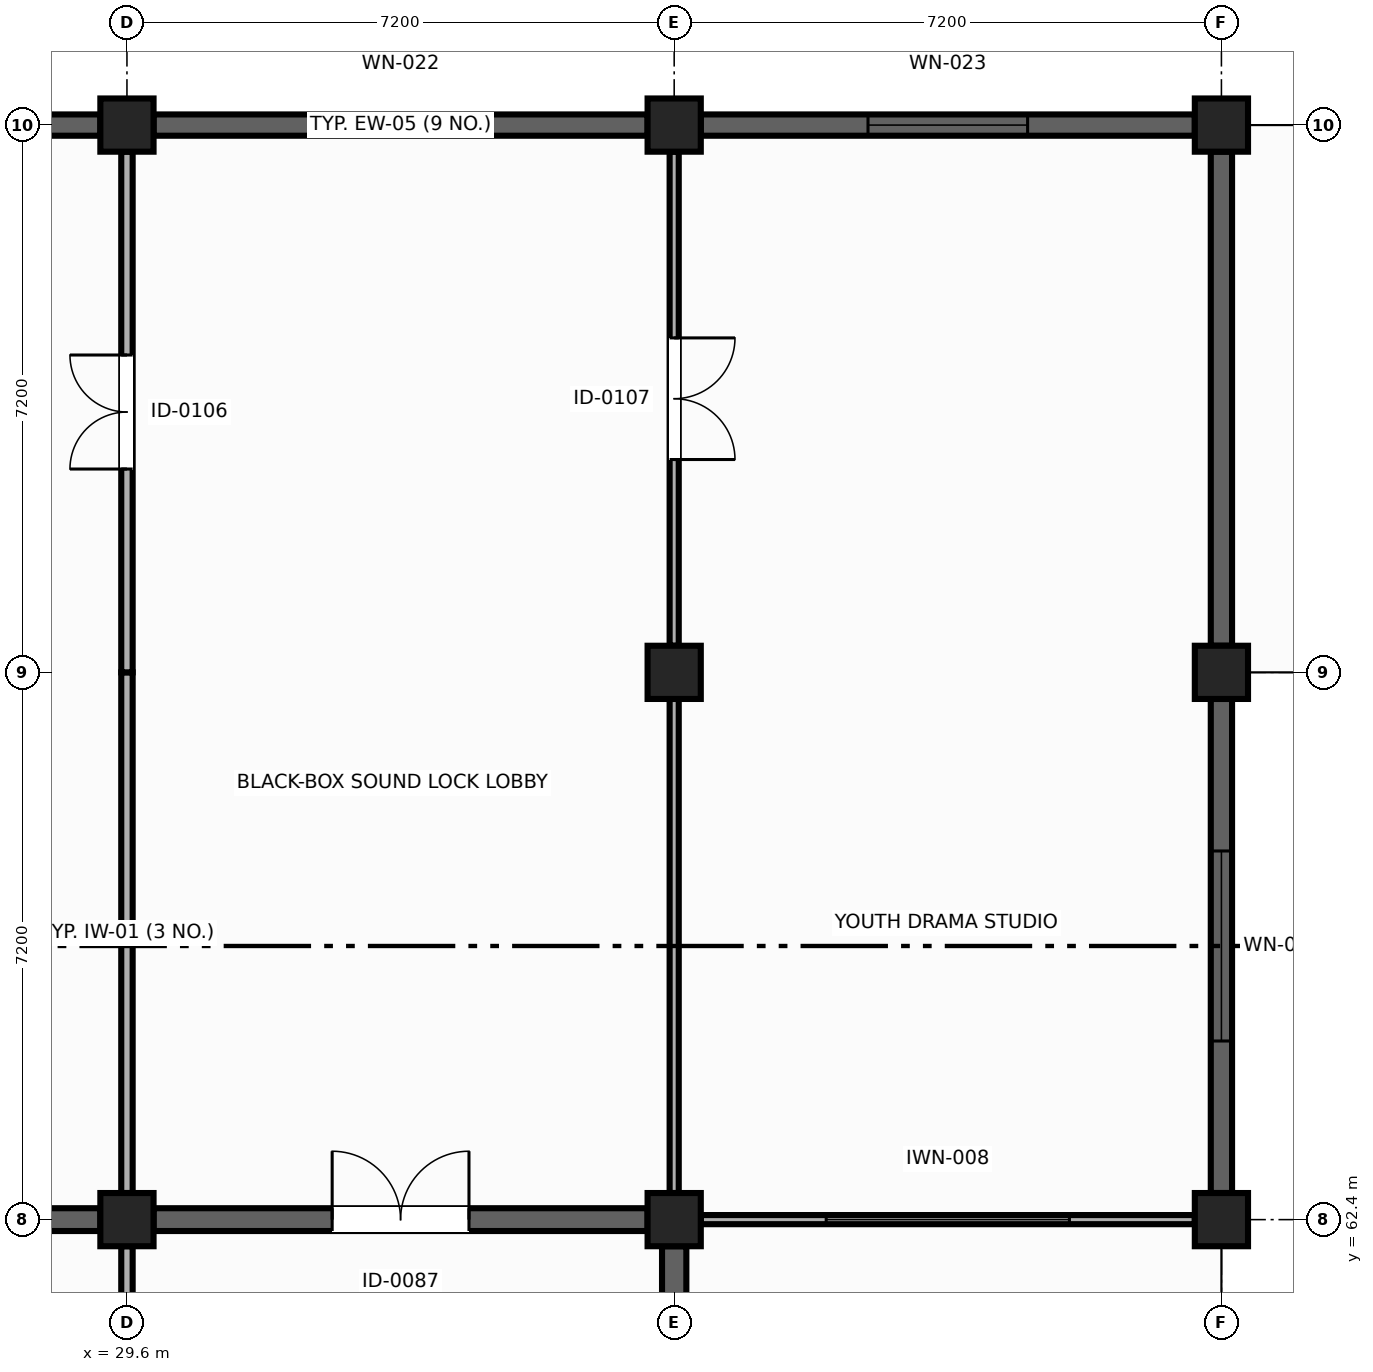
"""IFC4 building model, lengths in metres.
Left out: names, types, materials, properties, quantities, classifications, styles, units other than length and angle.
Written with IfcOpenShell. Run it as: python <this file> out.ifc"""

import sys

from ifc_helpers import new_model, si_unit, direction, frame, frame_2d, origin, origin_2d, place, context, subcontext, project, spatial, rectangle, extrude, element, fill, save


model = new_model("IFC4")
c1 = context("Model", 3, precision=1e-05, world=origin(), true_north=direction((0.0, 1.0)))
c2 = subcontext(c1, "Body", "Model", "MODEL_VIEW")
j1 = project(units=[si_unit("LENGTHUNIT", "METRE"), si_unit("PLANEANGLEUNIT", "RADIAN")], contexts=[c1])
p1 = place(None, origin())
s1 = spatial("IfcSite", under=j1, at=p1, CompositionType="ELEMENT")
p2 = place(p1, origin())
s2 = spatial("IfcBuilding", under=s1, at=p2, CompositionType="ELEMENT")
p3 = place(p2, origin())
s3 = spatial("IfcBuildingStorey", under=s2, at=p3, CompositionType="ELEMENT", Elevation=0.0)
for number, where, z_axis, x_axis in (
    (1, (29.6, 62.4, 0.0), (0.0, 0.0, 1.0), (1.0, 0.0, 0.0)),
    (2, (36.8, 62.4, 0.0), (0.0, 0.0, 1.0), (0.0, 1.0, 0.0)),
    (3, (44.0, 62.4, 0.0), (0.0, 0.0, 1.0), (1.0, 0.0, 0.0)),
    (4, (36.8, 69.6, 0.0), (0.0, 0.0, 1.0), (1.0, 0.0, 0.0)),
    (5, (44.0, 69.6, 0.0), (0.0, 0.0, 1.0), (0.0, 1.0, 0.0)),
    (6, (29.6, 76.8, 0.0), (0.0, 0.0, 1.0), (1.0, 0.0, 0.0)),
    (7, (36.8, 76.8, 0.0), (0.0, 0.0, 1.0), (0.0, 1.0, 0.0)),
    (8, (44.0, 76.8, 0.0), (0.0, 0.0, 1.0), (1.0, 0.0, 0.0)),
):
    element("IfcColumn", number, at=place(p3, frame(where, z_axis=z_axis, x_axis=x_axis)), inside=s3, PredefinedType="COLUMN", context=c2, shape_type="SweptSolid", body=[
        extrude(rectangle(XDim=0.7, YDim=0.7, at=origin_2d()), origin(), (0.0, 0.0, 1.0), 5.4),
    ])
p4 = place(p3, frame((36.8, 62.05, 0.0), z_axis=(0.0, 0.0, 1.0), x_axis=(0.0, -1.0, 0.0)))
e9 = element("IfcWall", 9, at=p4, inside=s3, PredefinedType="SOLIDWALL", context=c2, shape_type="SweptSolid", body=[
    extrude(rectangle(XDim=6.5, YDim=0.32, at=frame_2d((3.25, 0.0))), origin(), (0.0, 0.0, 1.0), 5.12),
])
p5 = place(p4, frame((2.25, 0.0, 0.0)))
e10 = element("IfcOpeningElement", 10, at=p5, cuts=e9, PredefinedType="OPENING", context=c2, shape_type="SweptSolid", body=[
    extrude(rectangle(XDim=2.0, YDim=2.35, at=frame_2d((1.0, 1.175))), frame((0.0, 0.17, 0.0), z_axis=(0.0, -1.0, 0.0), x_axis=(1.0, 0.0, 0.0)), (0.0, 0.0, 1.0), 0.34),
])
p6 = place(p3, frame((22.75, 76.8, 0.0), z_axis=(0.0, 0.0, 1.0), x_axis=(1.0, 0.0, 0.0)))
e11 = element("IfcWall", 11, at=p6, inside=s3, PredefinedType="SOLIDWALL", context=c2, shape_type="SweptSolid", body=[
    extrude(rectangle(XDim=6.5, YDim=0.28, at=frame_2d((3.25, 0.0))), origin(), (0.0, 0.0, 1.0), 5.15),
])
p7 = place(p3, frame((29.95, 76.8, 0.0), z_axis=(0.0, 0.0, 1.0), x_axis=(1.0, 0.0, 0.0)))
e12 = element("IfcWall", 12, at=p7, inside=s3, PredefinedType="SOLIDWALL", context=c2, shape_type="SweptSolid", body=[
    extrude(rectangle(XDim=6.5, YDim=0.28, at=frame_2d((3.25, 0.0))), origin(), (0.0, 0.0, 1.0), 5.15),
])
p8 = place(p7, frame((2.4, 0.0, 0.9)))
e13 = element("IfcOpeningElement", 13, at=p8, cuts=e12, PredefinedType="OPENING", context=c2, shape_type="SweptSolid", body=[
    extrude(rectangle(XDim=1.7, YDim=1.6, at=frame_2d((0.85, 0.8))), frame((0.0, 0.15, 0.0), z_axis=(0.0, -1.0, 0.0), x_axis=(1.0, 0.0, 0.0)), (0.0, 0.0, 1.0), 0.3),
])
p9 = place(p3, frame((37.15, 76.8, 0.0), z_axis=(0.0, 0.0, 1.0), x_axis=(1.0, 0.0, 0.0)))
e14 = element("IfcWall", 14, at=p9, inside=s3, PredefinedType="SOLIDWALL", context=c2, shape_type="SweptSolid", body=[
    extrude(rectangle(XDim=6.5, YDim=0.28, at=frame_2d((3.25, 0.0))), origin(), (0.0, 0.0, 1.0), 5.15),
])
p10 = place(p9, frame((2.2, 0.0, 0.9)))
e15 = element("IfcOpeningElement", 15, at=p10, cuts=e14, PredefinedType="OPENING", context=c2, shape_type="SweptSolid", body=[
    extrude(rectangle(XDim=2.1, YDim=1.6, at=frame_2d((1.05, 0.8))), frame((0.0, 0.15, 0.0), z_axis=(0.0, -1.0, 0.0), x_axis=(1.0, 0.0, 0.0)), (0.0, 0.0, 1.0), 0.3),
])
p11 = place(p3, frame((44.0, 76.45, 0.0), z_axis=(0.0, 0.0, 1.0), x_axis=(0.0, -1.0, 0.0)))
e16 = element("IfcWall", 16, at=p11, inside=s3, PredefinedType="SOLIDWALL", context=c2, shape_type="SweptSolid", body=[
    extrude(rectangle(XDim=6.5, YDim=0.28, at=frame_2d((3.25, 0.0))), origin(), (0.0, 0.0, 1.0), 5.15),
])
p12 = place(p3, frame((44.0, 69.25, 0.0), z_axis=(0.0, 0.0, 1.0), x_axis=(0.0, -1.0, 0.0)))
e17 = element("IfcWall", 17, at=p12, inside=s3, PredefinedType="SOLIDWALL", context=c2, shape_type="SweptSolid", body=[
    extrude(rectangle(XDim=6.5, YDim=0.28, at=frame_2d((3.25, 0.0))), origin(), (0.0, 0.0, 1.0), 5.15),
])
p13 = place(p12, frame((2.0, 0.0, 0.9)))
e18 = element("IfcOpeningElement", 18, at=p13, cuts=e17, PredefinedType="OPENING", context=c2, shape_type="SweptSolid", body=[
    extrude(rectangle(XDim=2.5, YDim=1.6, at=frame_2d((1.25, 0.8))), frame((0.0, 0.15, 0.0), z_axis=(0.0, -1.0, 0.0), x_axis=(1.0, 0.0, 0.0)), (0.0, 0.0, 1.0), 0.3),
])
p14 = place(p3, frame((22.75, 62.4, 0.0), z_axis=(0.0, 0.0, 1.0), x_axis=(1.0, 0.0, 0.0)))
e19 = element("IfcWall", 19, at=p14, inside=s3, PredefinedType="SHEAR", context=c2, shape_type="SweptSolid", body=[
    extrude(rectangle(XDim=6.5, YDim=0.3, at=frame_2d((3.25, 0.0))), origin(), (0.0, 0.0, 1.0), 5.12),
])
p15 = place(p14, frame((2.15, 0.0, 1.1)))
e20 = element("IfcOpeningElement", 20, at=p15, cuts=e19, PredefinedType="OPENING", context=c2, shape_type="SweptSolid", body=[
    extrude(rectangle(XDim=2.2, YDim=1.3, at=frame_2d((1.1, 0.65))), frame((0.0, 0.16, 0.0), z_axis=(0.0, -1.0, 0.0), x_axis=(1.0, 0.0, 0.0)), (0.0, 0.0, 1.0), 0.32),
])
p16 = place(p3, frame((29.95, 62.4, 0.0), z_axis=(0.0, 0.0, 1.0), x_axis=(1.0, 0.0, 0.0)))
e21 = element("IfcWall", 21, at=p16, inside=s3, PredefinedType="SHEAR", context=c2, shape_type="SweptSolid", body=[
    extrude(rectangle(XDim=6.5, YDim=0.3, at=frame_2d((3.25, 0.0))), origin(), (0.0, 0.0, 1.0), 5.12),
])
p17 = place(p16, frame((2.35, 0.0, 0.0)))
e22 = element("IfcOpeningElement", 22, at=p17, cuts=e21, PredefinedType="OPENING", context=c2, shape_type="SweptSolid", body=[
    extrude(rectangle(XDim=1.8, YDim=2.3, at=frame_2d((0.9, 1.15))), frame((0.0, 0.16, 0.0), z_axis=(0.0, -1.0, 0.0), x_axis=(1.0, 0.0, 0.0)), (0.0, 0.0, 1.0), 0.32),
])
p18 = place(p3, frame((29.6, 62.05, 0.0), z_axis=(0.0, 0.0, 1.0), x_axis=(0.0, -1.0, 0.0)))
e23 = element("IfcWall", 23, at=p18, inside=s3, PredefinedType="PARTITIONING", context=c2, shape_type="SweptSolid", body=[
    extrude(rectangle(XDim=3.65, YDim=0.15, at=frame_2d((1.825, 0.0))), origin(), (0.0, 0.0, 1.0), 4.315),
])
p19 = place(p3, frame((29.6, 62.75, 0.0), z_axis=(0.0, 0.0, 1.0), x_axis=(0.0, 1.0, 0.0)))
e24 = element("IfcWall", 24, at=p19, inside=s3, PredefinedType="PARTITIONING", context=c2, shape_type="SweptSolid", body=[
    extrude(rectangle(XDim=6.85, YDim=0.15, at=frame_2d((3.425, 0.0))), origin(), (0.0, 0.0, 1.0), 5.15),
])
p20 = place(p3, frame((29.6, 69.6, 0.0), z_axis=(0.0, 0.0, 1.0), x_axis=(0.0, 1.0, 0.0)))
e25 = element("IfcWall", 25, at=p20, inside=s3, PredefinedType="PARTITIONING", context=c2, shape_type="SweptSolid", body=[
    extrude(rectangle(XDim=6.85, YDim=0.15, at=frame_2d((3.425, 0.0))), origin(), (0.0, 0.0, 1.0), 5.15),
])
p21 = place(p20, frame((2.675, 0.0, 0.0)))
e26 = element("IfcOpeningElement", 26, at=p21, cuts=e25, PredefinedType="OPENING", context=c2, shape_type="SweptSolid", body=[
    extrude(rectangle(XDim=1.5, YDim=2.2, at=frame_2d((0.75, 1.1))), frame((0.0, 0.085, 0.0), z_axis=(0.0, -1.0, 0.0), x_axis=(1.0, 0.0, 0.0)), (0.0, 0.0, 1.0), 0.17),
])
p22 = place(p3, frame((36.8, 76.45, 0.0), z_axis=(0.0, 0.0, 1.0), x_axis=(0.0, -1.0, 0.0)))
e27 = element("IfcWall", 27, at=p22, inside=s3, PredefinedType="PARTITIONING", context=c2, shape_type="SweptSolid", body=[
    extrude(rectangle(XDim=6.5, YDim=0.12, at=frame_2d((3.25, 0.0))), origin(), (0.0, 0.0, 1.0), 4.345),
])
p23 = place(p22, frame((2.45, 0.0, 0.0)))
e28 = element("IfcOpeningElement", 28, at=p23, cuts=e27, PredefinedType="OPENING", context=c2, shape_type="SweptSolid", body=[
    extrude(rectangle(XDim=1.6, YDim=2.25, at=frame_2d((0.8, 1.125))), frame((0.0, 0.07, 0.0), z_axis=(0.0, -1.0, 0.0), x_axis=(1.0, 0.0, 0.0)), (0.0, 0.0, 1.0), 0.14),
])
p24 = place(p3, frame((36.8, 69.25, 0.0), z_axis=(0.0, 0.0, 1.0), x_axis=(0.0, -1.0, 0.0)))
e29 = element("IfcWall", 29, at=p24, inside=s3, PredefinedType="PARTITIONING", context=c2, shape_type="SweptSolid", body=[
    extrude(rectangle(XDim=6.5, YDim=0.12, at=frame_2d((3.25, 0.0))), origin(), (0.0, 0.0, 1.0), 4.345),
])
p25 = place(p3, frame((37.15, 62.4, 0.0), z_axis=(0.0, 0.0, 1.0), x_axis=(1.0, 0.0, 0.0)))
e30 = element("IfcWall", 30, at=p25, inside=s3, PredefinedType="PARTITIONING", context=c2, shape_type="SweptSolid", body=[
    extrude(rectangle(XDim=6.5, YDim=0.12, at=frame_2d((3.25, 0.0))), origin(), (0.0, 0.0, 1.0), 4.345),
])
p26 = place(p25, frame((1.65, 0.0, 1.1)))
e31 = element("IfcOpeningElement", 31, at=p26, cuts=e30, PredefinedType="OPENING", context=c2, shape_type="SweptSolid", body=[
    extrude(rectangle(XDim=3.2, YDim=1.3, at=frame_2d((1.6, 0.65))), frame((0.0, 0.07, 0.0), z_axis=(0.0, -1.0, 0.0), x_axis=(1.0, 0.0, 0.0)), (0.0, 0.0, 1.0), 0.14),
])
p27 = place(p8, origin())
e32 = element("IfcWindow", 32, at=p27, inside=s3, PartitioningType="SINGLE_PANEL", PredefinedType="WINDOW", context=c2, shape_type="SweptSolid", body=[
    extrude(rectangle(XDim=1.7, YDim=1.6, at=frame_2d((0.85, 0.8))), frame((0.0, 0.03, 0.0), z_axis=(0.0, -1.0, 0.0), x_axis=(1.0, 0.0, 0.0)), (0.0, 0.0, 1.0), 0.06),
])
fill(e13, e32)
p28 = place(p10, origin())
e33 = element("IfcWindow", 33, at=p28, inside=s3, PartitioningType="SINGLE_PANEL", PredefinedType="WINDOW", context=c2, shape_type="SweptSolid", body=[
    extrude(rectangle(XDim=2.1, YDim=1.6, at=frame_2d((1.05, 0.8))), frame((0.0, 0.03, 0.0), z_axis=(0.0, -1.0, 0.0), x_axis=(1.0, 0.0, 0.0)), (0.0, 0.0, 1.0), 0.06),
])
fill(e15, e33)
p29 = place(p13, origin())
e34 = element("IfcWindow", 34, at=p29, inside=s3, PartitioningType="SINGLE_PANEL", PredefinedType="WINDOW", context=c2, shape_type="SweptSolid", body=[
    extrude(rectangle(XDim=2.5, YDim=1.6, at=frame_2d((1.25, 0.8))), frame((0.0, 0.03, 0.0), z_axis=(0.0, -1.0, 0.0), x_axis=(1.0, 0.0, 0.0)), (0.0, 0.0, 1.0), 0.06),
])
fill(e18, e34)
p30 = place(p17, origin())
e35 = element("IfcDoor", 35, at=p30, inside=s3, OperationType="DOUBLE_DOOR_SINGLE_SWING", PredefinedType="DOOR", context=c2, shape_type="SweptSolid", body=[
    extrude(rectangle(XDim=1.8, YDim=2.3, at=frame_2d((0.9, 1.15))), frame((0.0, 0.025, 0.0), z_axis=(0.0, -1.0, 0.0), x_axis=(1.0, 0.0, 0.0)), (0.0, 0.0, 1.0), 0.05),
])
fill(e22, e35)
p31 = place(p21, origin())
e36 = element("IfcDoor", 36, at=p31, inside=s3, OperationType="DOUBLE_DOOR_SINGLE_SWING", PredefinedType="DOOR", context=c2, shape_type="SweptSolid", body=[
    extrude(rectangle(XDim=1.5, YDim=2.2, at=frame_2d((0.75, 1.1))), frame((0.0, 0.025, 0.0), z_axis=(0.0, -1.0, 0.0), x_axis=(1.0, 0.0, 0.0)), (0.0, 0.0, 1.0), 0.05),
])
fill(e26, e36)
p32 = place(p23, origin())
e37 = element("IfcDoor", 37, at=p32, inside=s3, OperationType="DOUBLE_DOOR_SINGLE_SWING", PredefinedType="DOOR", context=c2, shape_type="SweptSolid", body=[
    extrude(rectangle(XDim=1.6, YDim=2.25, at=frame_2d((0.8, 1.125))), frame((0.0, 0.025, 0.0), z_axis=(0.0, -1.0, 0.0), x_axis=(1.0, 0.0, 0.0)), (0.0, 0.0, 1.0), 0.05),
])
fill(e28, e37)
p33 = place(p26, origin())
e38 = element("IfcWindow", 38, at=p33, inside=s3, PartitioningType="SINGLE_PANEL", PredefinedType="WINDOW", context=c2, shape_type="SweptSolid", body=[
    extrude(rectangle(XDim=3.2, YDim=1.3, at=frame_2d((1.6, 0.65))), frame((0.0, 0.03, 0.0), z_axis=(0.0, -1.0, 0.0), x_axis=(1.0, 0.0, 0.0)), (0.0, 0.0, 1.0), 0.06),
])
fill(e31, e38)
save(model, sys.argv[1])
